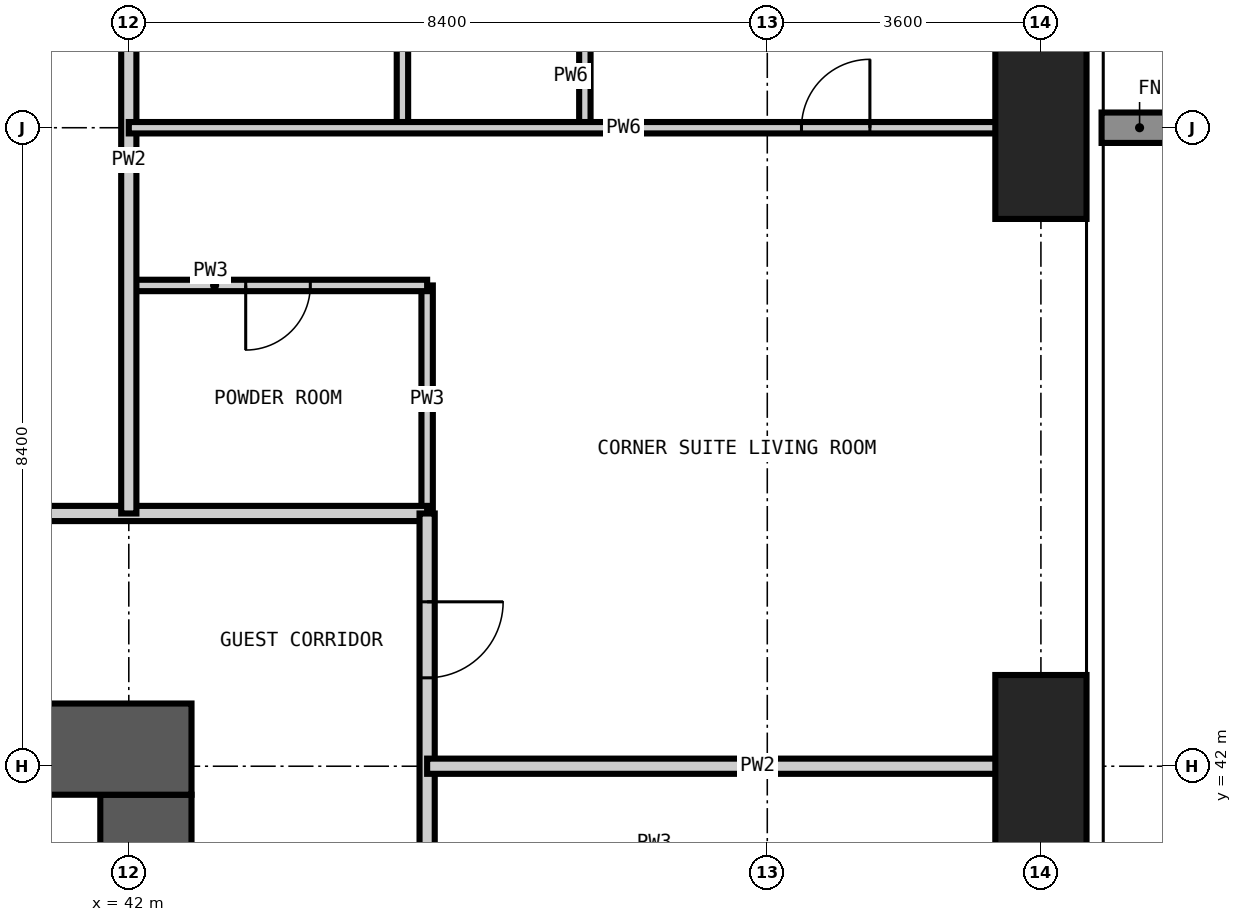
"""IFC4 building model, lengths in metres.
Left out: names, types, materials, properties, quantities, classifications, styles, units other than length and angle.
Written with IfcOpenShell. Run it as: python <this file> out.ifc"""

import sys

from ifc_helpers import new_model, si_unit, direction, frame, frame_2d, origin, origin_2d, place, context, subcontext, project, spatial, rectangle, extrude, element, fill, save


model = new_model("IFC4")
c1 = context("Model", 3, precision=1e-05, world=origin(), true_north=direction((0.0, 1.0)))
c2 = subcontext(c1, "Body", "Model", "MODEL_VIEW")
j1 = project(units=[si_unit("LENGTHUNIT", "METRE"), si_unit("PLANEANGLEUNIT", "RADIAN")], contexts=[c1])
p1 = place(None, origin())
s1 = spatial("IfcSite", under=j1, at=p1, CompositionType="ELEMENT")
p2 = place(p1, origin())
s2 = spatial("IfcBuilding", under=s1, at=p2, CompositionType="ELEMENT")
p3 = place(p2, frame((0.0, 0.0, 100.8)))
s3 = spatial("IfcBuildingStorey", under=s2, at=p3, CompositionType="ELEMENT", Elevation=100.8)
for number, where, z_axis, x_axis in (
    (1, (54.0, 42.0, -0.35), (0.0, 0.0, 1.0), (1.0, 0.0, 0.0)),
    (2, (54.0, 50.4, -0.35), (0.0, 0.0, 1.0), (1.0, 0.0, 0.0)),
):
    element("IfcColumn", number, at=place(p3, frame(where, z_axis=z_axis, x_axis=x_axis)), inside=s3, PredefinedType="COLUMN", context=c2, shape_type="SweptSolid", body=[
        extrude(rectangle(XDim=1.2, YDim=2.4, at=origin_2d()), origin(), (0.0, 0.0, 1.0), 3.6),
    ])
p4 = place(p3, frame((42.225, 17.175, -0.35), z_axis=(0.0, 0.0, 1.0), x_axis=(0.0, 1.0, 0.0)))
e3 = element("IfcWall", 3, at=p4, inside=s3, PredefinedType="SHEAR", context=c2, shape_type="SweptSolid", body=[
    extrude(rectangle(XDim=24.45, YDim=1.2, at=frame_2d((12.225, 0.0))), origin(), (0.0, 0.0, 1.0), 3.6),
])
p5 = place(p4, frame((0.425, 0.0, 0.35)))
e4 = element("IfcOpeningElement", 4, at=p5, cuts=e3, PredefinedType="OPENING", context=c2, shape_type="SweptSolid", body=[
    extrude(rectangle(XDim=1.2, YDim=2.2, at=frame_2d((0.6, 1.1))), frame((0.0, 0.61, 0.0), z_axis=(0.0, -1.0, 0.0), x_axis=(1.0, 0.0, 0.0)), (0.0, 0.0, 1.0), 1.22),
])
p6 = place(p4, frame((11.325, 0.0, 0.35)))
e5 = element("IfcOpeningElement", 5, at=p6, cuts=e3, PredefinedType="OPENING", context=c2, shape_type="SweptSolid", body=[
    extrude(rectangle(XDim=1.8, YDim=2.2, at=frame_2d((0.9, 1.1))), frame((0.0, 0.61, 0.0), z_axis=(0.0, -1.0, 0.0), x_axis=(1.0, 0.0, 0.0)), (0.0, 0.0, 1.0), 1.22),
])
p7 = place(p4, frame((20.125, 0.0, 0.35)))
e6 = element("IfcOpeningElement", 6, at=p7, cuts=e3, PredefinedType="OPENING", context=c2, shape_type="SweptSolid", body=[
    extrude(rectangle(XDim=1.0, YDim=2.1, at=frame_2d((0.5, 1.05))), frame((0.0, 0.61, 0.0), z_axis=(0.0, -1.0, 0.0), x_axis=(1.0, 0.0, 0.0)), (0.0, 0.0, 1.0), 1.22),
])
p8 = place(p3, frame((42.825, 42.225, -0.35), z_axis=(0.0, 0.0, 1.0), x_axis=(-1.0, 0.0, 0.0)))
e7 = element("IfcWall", 7, at=p8, inside=s3, PredefinedType="SHEAR", context=c2, shape_type="SweptSolid", body=[
    extrude(rectangle(XDim=26.85, YDim=1.2, at=frame_2d((13.425, 0.0))), origin(), (0.0, 0.0, 1.0), 3.6),
])
p9 = place(p8, frame((21.325, 0.0, 0.35)))
e8 = element("IfcOpeningElement", 8, at=p9, cuts=e7, PredefinedType="OPENING", context=c2, shape_type="SweptSolid", body=[
    extrude(rectangle(XDim=1.0, YDim=2.1, at=frame_2d((0.5, 1.05))), frame((0.0, 0.61, 0.0), z_axis=(0.0, -1.0, 0.0), x_axis=(1.0, 0.0, 0.0)), (0.0, 0.0, 1.0), 1.22),
])
p10 = place(p8, frame((10.725, 0.0, 0.35)))
e9 = element("IfcOpeningElement", 9, at=p10, cuts=e7, PredefinedType="OPENING", context=c2, shape_type="SweptSolid", body=[
    extrude(rectangle(XDim=1.2, YDim=2.2, at=frame_2d((0.6, 1.1))), frame((0.0, 0.61, 0.0), z_axis=(0.0, -1.0, 0.0), x_axis=(1.0, 0.0, 0.0)), (0.0, 0.0, 1.0), 1.22),
])
p11 = place(p3, frame((45.925, 45.325, 0.0), z_axis=(0.0, 0.0, 1.0), x_axis=(0.0, 1.0, 0.0)))
e10 = element("IfcWall", 10, at=p11, inside=s3, PredefinedType="PARTITIONING", context=c2, shape_type="SweptSolid", body=[
    extrude(rectangle(XDim=3.0, YDim=0.15, at=frame_2d((1.5, 0.0))), origin(), (0.0, 0.0, 1.0), 3.25),
])
p12 = place(p3, frame((42.0, 48.325, 0.0), z_axis=(0.0, 0.0, 1.0), x_axis=(1.0, 0.0, 0.0)))
e11 = element("IfcWall", 11, at=p12, inside=s3, PredefinedType="PARTITIONING", context=c2, shape_type="SweptSolid", body=[
    extrude(rectangle(XDim=3.925, YDim=0.15, at=frame_2d((1.962, 0.0))), origin(), (0.0, 0.0, 1.0), 3.25),
])
p13 = place(p12, frame((1.538, 0.0, 0.0)))
e12 = element("IfcOpeningElement", 12, at=p13, cuts=e11, PredefinedType="OPENING", context=c2, shape_type="SweptSolid", body=[
    extrude(rectangle(XDim=0.85, YDim=2.1, at=frame_2d((0.425, 1.05))), frame((0.0, 0.085, 0.0), z_axis=(0.0, -1.0, 0.0), x_axis=(1.0, 0.0, 0.0)), (0.0, 0.0, 1.0), 0.17),
])
p14 = place(p3, frame((12.6, 45.325, 0.0), z_axis=(0.0, 0.0, 1.0), x_axis=(1.0, 0.0, 0.0)))
e13 = element("IfcWall", 13, at=p14, inside=s3, PredefinedType="PARTITIONING", context=c2, shape_type="SweptSolid", body=[
    extrude(rectangle(XDim=33.325, YDim=0.2, at=frame_2d((16.663, 0.0))), origin(), (0.0, 0.0, 1.0), 3.25),
])
p15 = place(p14, frame((7.9, 0.0, 0.0)))
e14 = element("IfcOpeningElement", 14, at=p15, cuts=e13, PredefinedType="OPENING", context=c2, shape_type="SweptSolid", body=[
    extrude(rectangle(XDim=1.0, YDim=2.2, at=frame_2d((0.5, 1.1))), frame((0.0, 0.11, 0.0), z_axis=(0.0, -1.0, 0.0), x_axis=(1.0, 0.0, 0.0)), (0.0, 0.0, 1.0), 0.22),
])
p16 = place(p14, frame((16.3, 0.0, 0.0)))
e15 = element("IfcOpeningElement", 15, at=p16, cuts=e13, PredefinedType="OPENING", context=c2, shape_type="SweptSolid", body=[
    extrude(rectangle(XDim=1.0, YDim=2.2, at=frame_2d((0.5, 1.1))), frame((0.0, 0.11, 0.0), z_axis=(0.0, -1.0, 0.0), x_axis=(1.0, 0.0, 0.0)), (0.0, 0.0, 1.0), 0.22),
])
p17 = place(p14, frame((24.7, 0.0, 0.0)))
e16 = element("IfcOpeningElement", 16, at=p17, cuts=e13, PredefinedType="OPENING", context=c2, shape_type="SweptSolid", body=[
    extrude(rectangle(XDim=1.0, YDim=2.2, at=frame_2d((0.5, 1.1))), frame((0.0, 0.11, 0.0), z_axis=(0.0, -1.0, 0.0), x_axis=(1.0, 0.0, 0.0)), (0.0, 0.0, 1.0), 0.22),
])
p18 = place(p3, frame((45.925, 45.325, 0.0), z_axis=(0.0, 0.0, 1.0), x_axis=(0.0, -1.0, 0.0)))
e17 = element("IfcWall", 17, at=p18, inside=s3, PredefinedType="PARTITIONING", context=c2, shape_type="SweptSolid", body=[
    extrude(rectangle(XDim=31.25, YDim=0.2, at=frame_2d((15.625, 0.0))), origin(), (0.0, 0.0, 1.0), 3.25),
])
p19 = place(p18, frame((25.925, 0.0, 0.0)))
e18 = element("IfcOpeningElement", 18, at=p19, cuts=e17, PredefinedType="OPENING", context=c2, shape_type="SweptSolid", body=[
    extrude(rectangle(XDim=1.0, YDim=2.2, at=frame_2d((0.5, 1.1))), frame((0.0, 0.11, 0.0), z_axis=(0.0, -1.0, 0.0), x_axis=(1.0, 0.0, 0.0)), (0.0, 0.0, 1.0), 0.22),
])
p20 = place(p18, frame((19.625, 0.0, 0.0)))
e19 = element("IfcOpeningElement", 19, at=p20, cuts=e17, PredefinedType="OPENING", context=c2, shape_type="SweptSolid", body=[
    extrude(rectangle(XDim=1.0, YDim=2.2, at=frame_2d((0.5, 1.1))), frame((0.0, 0.11, 0.0), z_axis=(0.0, -1.0, 0.0), x_axis=(1.0, 0.0, 0.0)), (0.0, 0.0, 1.0), 0.22),
])
p21 = place(p18, frame((11.225, 0.0, 0.0)))
e20 = element("IfcOpeningElement", 20, at=p21, cuts=e17, PredefinedType="OPENING", context=c2, shape_type="SweptSolid", body=[
    extrude(rectangle(XDim=1.0, YDim=2.2, at=frame_2d((0.5, 1.1))), frame((0.0, 0.11, 0.0), z_axis=(0.0, -1.0, 0.0), x_axis=(1.0, 0.0, 0.0)), (0.0, 0.0, 1.0), 0.22),
])
p22 = place(p18, frame((4.925, 0.0, 0.0)))
e21 = element("IfcOpeningElement", 21, at=p22, cuts=e17, PredefinedType="OPENING", context=c2, shape_type="SweptSolid", body=[
    extrude(rectangle(XDim=1.0, YDim=2.2, at=frame_2d((0.5, 1.1))), frame((0.0, 0.11, 0.0), z_axis=(0.0, -1.0, 0.0), x_axis=(1.0, 0.0, 0.0)), (0.0, 0.0, 1.0), 0.22),
])
p23 = place(p18, frame((29.387, 0.0, 0.0)))
e22 = element("IfcOpeningElement", 22, at=p23, cuts=e17, PredefinedType="OPENING", context=c2, shape_type="SweptSolid", body=[
    extrude(rectangle(XDim=1.0, YDim=2.2, at=frame_2d((0.5, 1.1))), frame((0.0, 0.11, 0.0), z_axis=(0.0, -1.0, 0.0), x_axis=(1.0, 0.0, 0.0)), (0.0, 0.0, 1.0), 0.22),
])
p24 = place(p18, frame((1.162, 0.0, 0.0)))
e23 = element("IfcOpeningElement", 23, at=p24, cuts=e17, PredefinedType="OPENING", context=c2, shape_type="SweptSolid", body=[
    extrude(rectangle(XDim=1.0, YDim=2.2, at=frame_2d((0.5, 1.1))), frame((0.0, 0.11, 0.0), z_axis=(0.0, -1.0, 0.0), x_axis=(1.0, 0.0, 0.0)), (0.0, 0.0, 1.0), 0.22),
])
p25 = place(p3, frame((42.0, 45.325, 0.0), z_axis=(0.0, 0.0, 1.0), x_axis=(0.0, 1.0, 0.0)))
e24 = element("IfcWall", 24, at=p25, inside=s3, PredefinedType="PARTITIONING", context=c2, shape_type="SweptSolid", body=[
    extrude(rectangle(XDim=9.293, YDim=0.2, at=frame_2d((4.646, 0.0))), origin(), (0.0, 0.0, 1.0), 3.25),
])
p26 = place(p3, frame((45.925, 42.0, 0.0), z_axis=(0.0, 0.0, 1.0), x_axis=(1.0, 0.0, 0.0)))
e25 = element("IfcWall", 25, at=p26, inside=s3, PredefinedType="PARTITIONING", context=c2, shape_type="SweptSolid", body=[
    extrude(rectangle(XDim=8.693, YDim=0.2, at=frame_2d((4.346, 0.0))), origin(), (0.0, 0.0, 1.0), 3.25),
])
p27 = place(p3, frame((45.6, 50.4, 0.0), z_axis=(0.0, 0.0, 1.0), x_axis=(0.0, 1.0, 0.0)))
e26 = element("IfcWall", 26, at=p27, inside=s3, PredefinedType="PARTITIONING", context=c2, shape_type="SweptSolid", body=[
    extrude(rectangle(XDim=3.0, YDim=0.15, at=frame_2d((1.5, 0.0))), origin(), (0.0, 0.0, 1.0), 3.25),
])
p28 = place(p3, frame((48.0, 50.4, 0.0), z_axis=(0.0, 0.0, 1.0), x_axis=(0.0, 1.0, 0.0)))
e27 = element("IfcWall", 27, at=p28, inside=s3, PredefinedType="PARTITIONING", context=c2, shape_type="SweptSolid", body=[
    extrude(rectangle(XDim=3.0, YDim=0.15, at=frame_2d((1.5, 0.0))), origin(), (0.0, 0.0, 1.0), 3.25),
])
p29 = place(p28, frame((1.05, 0.0, 0.0)))
e28 = element("IfcOpeningElement", 28, at=p29, cuts=e27, PredefinedType="OPENING", context=c2, shape_type="SweptSolid", body=[
    extrude(rectangle(XDim=0.9, YDim=2.1, at=frame_2d((0.45, 1.05))), frame((0.0, 0.085, 0.0), z_axis=(0.0, -1.0, 0.0), x_axis=(1.0, 0.0, 0.0)), (0.0, 0.0, 1.0), 0.17),
])
p30 = place(p3, frame((42.0, 50.4, 0.0), z_axis=(0.0, 0.0, 1.0), x_axis=(1.0, 0.0, 0.0)))
e29 = element("IfcWall", 29, at=p30, inside=s3, PredefinedType="PARTITIONING", context=c2, shape_type="SweptSolid", body=[
    extrude(rectangle(XDim=12.618, YDim=0.15, at=frame_2d((6.309, 0.0))), origin(), (0.0, 0.0, 1.0), 3.25),
])
p31 = place(p30, frame((8.85, 0.0, 0.0)))
e30 = element("IfcOpeningElement", 30, at=p31, cuts=e29, PredefinedType="OPENING", context=c2, shape_type="SweptSolid", body=[
    extrude(rectangle(XDim=0.9, YDim=2.1, at=frame_2d((0.45, 1.05))), frame((0.0, 0.085, 0.0), z_axis=(0.0, -1.0, 0.0), x_axis=(1.0, 0.0, 0.0)), (0.0, 0.0, 1.0), 0.17),
])
p32 = place(p24, origin())
e31 = element("IfcDoor", 31, at=p32, inside=s3, OperationType="SINGLE_SWING_LEFT", PredefinedType="DOOR", context=c2, shape_type="SweptSolid", body=[
    extrude(rectangle(XDim=1.0, YDim=2.2, at=frame_2d((0.5, 1.1))), frame((0.0, 0.025, 0.0), z_axis=(0.0, -1.0, 0.0), x_axis=(1.0, 0.0, 0.0)), (0.0, 0.0, 1.0), 0.05),
])
fill(e23, e31)
p33 = place(p13, frame((0.85, 0.0, 0.0), z_axis=(0.0, 0.0, 1.0), x_axis=(-1.0, 0.0, 0.0)))
e32 = element("IfcDoor", 32, at=p33, inside=s3, OperationType="SINGLE_SWING_RIGHT", PredefinedType="DOOR", context=c2, shape_type="SweptSolid", body=[
    extrude(rectangle(XDim=0.85, YDim=2.1, at=frame_2d((0.425, 1.05))), frame((0.0, 0.025, 0.0), z_axis=(0.0, -1.0, 0.0), x_axis=(1.0, 0.0, 0.0)), (0.0, 0.0, 1.0), 0.05),
])
fill(e12, e32)
p34 = place(p31, origin())
e33 = element("IfcDoor", 33, at=p34, inside=s3, OperationType="SINGLE_SWING_RIGHT", PredefinedType="DOOR", context=c2, shape_type="SweptSolid", body=[
    extrude(rectangle(XDim=0.9, YDim=2.1, at=frame_2d((0.45, 1.05))), frame((0.0, 0.025, 0.0), z_axis=(0.0, -1.0, 0.0), x_axis=(1.0, 0.0, 0.0)), (0.0, 0.0, 1.0), 0.05),
])
fill(e30, e33)
save(model, sys.argv[1])
